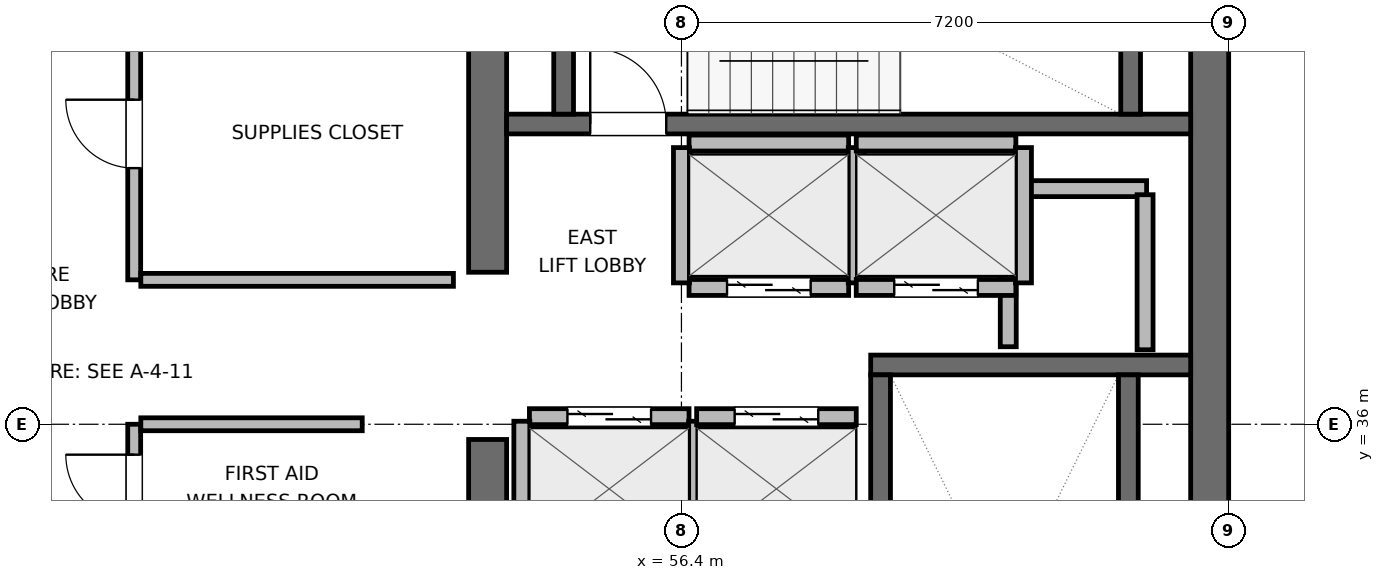
"""IFC4 building model, lengths in metres.
Left out: names, types, materials, properties, quantities, classifications, styles, units other than length and angle.
Written with IfcOpenShell. Run it as: python <this file> out.ifc"""

import sys

from ifc_helpers import new_model, si_unit, direction, frame, frame_2d, origin, place, context, subcontext, project, spatial, rectangle, extrude, element, fill, save


model = new_model("IFC4")
c1 = context("Model", 3, precision=1e-05, world=origin(), true_north=direction((0.0, 1.0)))
c2 = subcontext(c1, "Body", "Model", "MODEL_VIEW")
j1 = project(units=[si_unit("LENGTHUNIT", "METRE"), si_unit("PLANEANGLEUNIT", "RADIAN")], contexts=[c1])
p1 = place(None, origin())
s1 = spatial("IfcSite", under=j1, at=p1, CompositionType="ELEMENT")
p2 = place(p1, origin())
s2 = spatial("IfcBuilding", under=s1, at=p2, CompositionType="ELEMENT")
p3 = place(p2, frame((0.0, 0.0, 286.2)))
s3 = spatial("IfcBuildingStorey", under=s2, at=p3, CompositionType="ELEMENT", Elevation=286.2)
p4 = place(p3, frame((53.85, 27.85, 0.0), z_axis=(0.0, 0.0, 1.0), x_axis=(0.0, 1.0, 0.0)))
e1 = element("IfcWall", 1, at=p4, inside=s3, PredefinedType="SHEAR", context=c2, shape_type="SweptSolid", body=[
    extrude(rectangle(XDim=7.95, YDim=0.5, at=frame_2d((3.975, 0.0))), origin(), (0.0, 0.0, 1.0), 3.9),
])
p5 = place(p3, frame((53.85, 38.0, 0.0), z_axis=(0.0, 0.0, 1.0), x_axis=(0.0, 1.0, 0.0)))
e2 = element("IfcWall", 2, at=p5, inside=s3, PredefinedType="SHEAR", context=c2, shape_type="SweptSolid", body=[
    extrude(rectangle(XDim=6.15, YDim=0.5, at=frame_2d((3.075, 0.0))), origin(), (0.0, 0.0, 1.0), 3.9),
])
p6 = place(p3, frame((63.35, 27.6, 0.0), z_axis=(0.0, 0.0, 1.0), x_axis=(0.0, 1.0, 0.0)))
e3 = element("IfcWall", 3, at=p6, inside=s3, PredefinedType="SHEAR", context=c2, shape_type="SweptSolid", body=[
    extrude(rectangle(XDim=16.8, YDim=0.5, at=frame_2d((8.4, 0.0))), origin(), (0.0, 0.0, 1.0), 3.9),
])
p7 = place(p3, frame((58.89, 36.78, 0.0), z_axis=(0.0, 0.0, 1.0), x_axis=(1.0, 0.0, 0.0)))
e4 = element("IfcWall", 4, at=p7, inside=s3, PredefinedType="SHEAR", context=c2, shape_type="SweptSolid", body=[
    extrude(rectangle(XDim=4.21, YDim=0.26, at=frame_2d((2.105, 0.0))), origin(), (0.0, 0.0, 1.0), 3.9),
])
p8 = place(p3, frame((59.02, 29.05, 0.0), z_axis=(0.0, 0.0, 1.0), x_axis=(0.0, 1.0, 0.0)))
e5 = element("IfcWall", 5, at=p8, inside=s3, PredefinedType="SHEAR", context=c2, shape_type="SweptSolid", body=[
    extrude(rectangle(XDim=7.6, YDim=0.26, at=frame_2d((3.8, 0.0))), origin(), (0.0, 0.0, 1.0), 3.9),
])
p9 = place(p8, frame((0.3, 0.0, 0.0)))
e6 = element("IfcOpeningElement", 6, at=p9, cuts=e5, PredefinedType="OPENING", context=c2, shape_type="SweptSolid", body=[
    extrude(rectangle(XDim=1.0, YDim=2.04, at=frame_2d((0.5, 1.02))), frame((0.0, 0.14, 0.0), z_axis=(0.0, -1.0, 0.0), x_axis=(1.0, 0.0, 0.0)), (0.0, 0.0, 1.0), 0.28),
])
p10 = place(p3, frame((62.28, 29.05, 0.0), z_axis=(0.0, 0.0, 1.0), x_axis=(0.0, 1.0, 0.0)))
e7 = element("IfcWall", 7, at=p10, inside=s3, PredefinedType="SHEAR", context=c2, shape_type="SweptSolid", body=[
    extrude(rectangle(XDim=7.6, YDim=0.26, at=frame_2d((3.8, 0.0))), origin(), (0.0, 0.0, 1.0), 3.9),
])
p11 = place(p3, frame((54.1, 39.95, 0.0), z_axis=(0.0, 0.0, 1.0), x_axis=(1.0, 0.0, 0.0)))
e8 = element("IfcWall", 8, at=p11, inside=s3, PredefinedType="SHEAR", context=c2, shape_type="SweptSolid", body=[
    extrude(rectangle(XDim=9.0, YDim=0.26, at=frame_2d((4.5, 0.0))), origin(), (0.0, 0.0, 1.0), 3.9),
])
p12 = place(p11, frame((1.1, 0.0, 0.0)))
e9 = element("IfcOpeningElement", 9, at=p12, cuts=e8, PredefinedType="OPENING", context=c2, shape_type="SweptSolid", body=[
    extrude(rectangle(XDim=1.0, YDim=2.04, at=frame_2d((0.5, 1.02))), frame((0.0, 0.14, 0.0), z_axis=(0.0, -1.0, 0.0), x_axis=(1.0, 0.0, 0.0)), (0.0, 0.0, 1.0), 0.28),
])
for number, where, z_axis, x_axis in (
    (10, (54.85, 40.08, 0.0), (0.0, 0.0, 1.0), (0.0, 1.0, 0.0)),
    (11, (62.31, 40.08, 0.0), (0.0, 0.0, 1.0), (0.0, 1.0, 0.0)),
):
    element("IfcWall", number, at=place(p3, frame(where, z_axis=z_axis, x_axis=x_axis)), inside=s3, PredefinedType="SHEAR", context=c2, shape_type="SweptSolid", body=[
        extrude(rectangle(XDim=2.94, YDim=0.26, at=frame_2d((1.47, 0.0))), origin(), (0.0, 0.0, 1.0), 3.9),
    ])
p13 = place(p3, frame((60.72, 39.1, 0.0), z_axis=(0.0, 0.0, 1.0), x_axis=(1.0, 0.0, 0.0)))
e12 = element("IfcWall", 12, at=p13, inside=s3, PredefinedType="PARTITIONING", context=c2, shape_type="SweptSolid", body=[
    extrude(rectangle(XDim=1.8, YDim=0.21, at=frame_2d((0.9, 0.0))), origin(), (0.0, 0.0, 1.0), 3.68),
])
p14 = place(p3, frame((60.7, 37.02, 0.0), z_axis=(0.0, 0.0, 1.0), x_axis=(0.0, 1.0, 0.0)))
e13 = element("IfcWall", 13, at=p14, inside=s3, PredefinedType="PARTITIONING", context=c2, shape_type="SweptSolid", body=[
    extrude(rectangle(XDim=1.96, YDim=0.21, at=frame_2d((0.98, 0.0))), origin(), (0.0, 0.0, 1.0), 3.68),
])
p15 = place(p3, frame((62.5, 36.98, 0.0), z_axis=(0.0, 0.0, 1.0), x_axis=(0.0, 1.0, 0.0)))
e14 = element("IfcWall", 14, at=p15, inside=s3, PredefinedType="PARTITIONING", context=c2, shape_type="SweptSolid", body=[
    extrude(rectangle(XDim=2.04, YDim=0.21, at=frame_2d((1.02, 0.0))), origin(), (0.0, 0.0, 1.0), 3.68),
])
p16 = place(p3, frame((54.4, 36.1, 0.0), z_axis=(0.0, 0.0, 1.0), x_axis=(1.0, 0.0, 0.0)))
e15 = element("IfcWall", 15, at=p16, inside=s3, PredefinedType="PARTITIONING", context=c2, shape_type="SweptSolid", body=[
    extrude(rectangle(XDim=2.1, YDim=0.21, at=frame_2d((1.05, 0.0))), origin(), (0.0, 0.0, 1.0), 3.68),
])
p17 = place(p16, frame((0.5, 0.0, 0.0)))
e16 = element("IfcOpeningElement", 16, at=p17, cuts=e15, PredefinedType="OPENING", context=c2, shape_type="SweptSolid", body=[
    extrude(rectangle(XDim=1.1, YDim=2.04, at=frame_2d((0.55, 1.02))), frame((0.0, 0.115, 0.0), z_axis=(0.0, -1.0, 0.0), x_axis=(1.0, 0.0, 0.0)), (0.0, 0.0, 1.0), 0.23),
])
for number, where, z_axis, x_axis in (
    (17, (54.3, 34.26, 0.0), (0.0, 0.0, 1.0), (0.0, 1.0, 0.0)),
    (18, (56.6, 34.26, 0.0), (0.0, 0.0, 1.0), (0.0, 1.0, 0.0)),
):
    element("IfcWall", number, at=place(p3, frame(where, z_axis=z_axis, x_axis=x_axis)), inside=s3, PredefinedType="PARTITIONING", context=c2, shape_type="SweptSolid", body=[
        extrude(rectangle(XDim=1.78, YDim=0.21, at=frame_2d((0.89, 0.0))), origin(), (0.0, 0.0, 1.0), 3.68),
    ])
p18 = place(p3, frame((56.6, 36.1, 0.0), z_axis=(0.0, 0.0, 1.0), x_axis=(1.0, 0.0, 0.0)))
e19 = element("IfcWall", 19, at=p18, inside=s3, PredefinedType="PARTITIONING", context=c2, shape_type="SweptSolid", body=[
    extrude(rectangle(XDim=2.1, YDim=0.21, at=frame_2d((1.05, 0.0))), origin(), (0.0, 0.0, 1.0), 3.68),
])
p19 = place(p18, frame((0.5, 0.0, 0.0)))
e20 = element("IfcOpeningElement", 20, at=p19, cuts=e19, PredefinedType="OPENING", context=c2, shape_type="SweptSolid", body=[
    extrude(rectangle(XDim=1.1, YDim=2.04, at=frame_2d((0.55, 1.02))), frame((0.0, 0.115, 0.0), z_axis=(0.0, -1.0, 0.0), x_axis=(1.0, 0.0, 0.0)), (0.0, 0.0, 1.0), 0.23),
])
p20 = place(p3, frame((56.5, 37.8, 0.0), z_axis=(0.0, 0.0, 1.0), x_axis=(1.0, 0.0, 0.0)))
e21 = element("IfcWall", 21, at=p20, inside=s3, PredefinedType="PARTITIONING", context=c2, shape_type="SweptSolid", body=[
    extrude(rectangle(XDim=2.1, YDim=0.21, at=frame_2d((1.05, 0.0))), origin(), (0.0, 0.0, 1.0), 3.68),
])
p21 = place(p20, frame((0.5, 0.0, 0.0)))
e22 = element("IfcOpeningElement", 22, at=p21, cuts=e21, PredefinedType="OPENING", context=c2, shape_type="SweptSolid", body=[
    extrude(rectangle(XDim=1.1, YDim=2.04, at=frame_2d((0.55, 1.02))), frame((0.0, 0.115, 0.0), z_axis=(0.0, -1.0, 0.0), x_axis=(1.0, 0.0, 0.0)), (0.0, 0.0, 1.0), 0.23),
])
p22 = place(p3, frame((56.5, 39.7, 0.0), z_axis=(0.0, 0.0, 1.0), x_axis=(1.0, 0.0, 0.0)))
e23 = element("IfcWall", 23, at=p22, inside=s3, PredefinedType="PARTITIONING", context=c2, shape_type="SweptSolid", body=[
    extrude(rectangle(XDim=2.1, YDim=0.21, at=frame_2d((1.05, 0.0))), origin(), (0.0, 0.0, 1.0), 3.68),
])
for number, where, z_axis, x_axis in (
    (24, (56.4, 37.86, 0.0), (0.0, 0.0, 1.0), (0.0, 1.0, 0.0)),
    (25, (58.7, 37.86, 0.0), (0.0, 0.0, 1.0), (0.0, 1.0, 0.0)),
):
    element("IfcWall", number, at=place(p3, frame(where, z_axis=z_axis, x_axis=x_axis)), inside=s3, PredefinedType="PARTITIONING", context=c2, shape_type="SweptSolid", body=[
        extrude(rectangle(XDim=1.78, YDim=0.21, at=frame_2d((0.89, 0.0))), origin(), (0.0, 0.0, 1.0), 3.68),
    ])
p23 = place(p3, frame((58.7, 37.8, 0.0), z_axis=(0.0, 0.0, 1.0), x_axis=(1.0, 0.0, 0.0)))
e26 = element("IfcWall", 26, at=p23, inside=s3, PredefinedType="PARTITIONING", context=c2, shape_type="SweptSolid", body=[
    extrude(rectangle(XDim=2.1, YDim=0.21, at=frame_2d((1.05, 0.0))), origin(), (0.0, 0.0, 1.0), 3.68),
])
p24 = place(p23, frame((0.5, 0.0, 0.0)))
e27 = element("IfcOpeningElement", 27, at=p24, cuts=e26, PredefinedType="OPENING", context=c2, shape_type="SweptSolid", body=[
    extrude(rectangle(XDim=1.1, YDim=2.04, at=frame_2d((0.55, 1.02))), frame((0.0, 0.115, 0.0), z_axis=(0.0, -1.0, 0.0), x_axis=(1.0, 0.0, 0.0)), (0.0, 0.0, 1.0), 0.23),
])
p25 = place(p3, frame((58.7, 39.7, 0.0), z_axis=(0.0, 0.0, 1.0), x_axis=(1.0, 0.0, 0.0)))
e28 = element("IfcWall", 28, at=p25, inside=s3, PredefinedType="PARTITIONING", context=c2, shape_type="SweptSolid", body=[
    extrude(rectangle(XDim=2.1, YDim=0.21, at=frame_2d((1.05, 0.0))), origin(), (0.0, 0.0, 1.0), 3.68),
])
p26 = place(p3, frame((60.9, 37.86, 0.0), z_axis=(0.0, 0.0, 1.0), x_axis=(0.0, 1.0, 0.0)))
e29 = element("IfcWall", 29, at=p26, inside=s3, PredefinedType="PARTITIONING", context=c2, shape_type="SweptSolid", body=[
    extrude(rectangle(XDim=1.78, YDim=0.21, at=frame_2d((0.89, 0.0))), origin(), (0.0, 0.0, 1.0), 3.68),
])
p27 = place(p3, frame((49.2, 32.6, 0.0), z_axis=(0.0, 0.0, 1.0), x_axis=(0.0, 1.0, 0.0)))
e30 = element("IfcWall", 30, at=p27, inside=s3, PredefinedType="PARTITIONING", context=c2, shape_type="SweptSolid", body=[
    extrude(rectangle(XDim=3.4, YDim=0.17, at=frame_2d((1.7, 0.0))), origin(), (0.0, 0.0, 1.0), 3.68),
])
p28 = place(p27, frame((0.4, 0.0, 0.0)))
e31 = element("IfcOpeningElement", 31, at=p28, cuts=e30, PredefinedType="OPENING", context=c2, shape_type="SweptSolid", body=[
    extrude(rectangle(XDim=0.9, YDim=2.02, at=frame_2d((0.45, 1.01))), frame((0.0, 0.095, 0.0), z_axis=(0.0, -1.0, 0.0), x_axis=(1.0, 0.0, 0.0)), (0.0, 0.0, 1.0), 0.19),
])
p29 = place(p27, frame((2.1, 0.0, 0.0)))
e32 = element("IfcOpeningElement", 32, at=p29, cuts=e30, PredefinedType="OPENING", context=c2, shape_type="SweptSolid", body=[
    extrude(rectangle(XDim=0.9, YDim=2.02, at=frame_2d((0.45, 1.01))), frame((0.0, 0.095, 0.0), z_axis=(0.0, -1.0, 0.0), x_axis=(1.0, 0.0, 0.0)), (0.0, 0.0, 1.0), 0.19),
])
p30 = place(p3, frame((49.287, 36.0, 0.0), z_axis=(0.0, 0.0, 1.0), x_axis=(1.0, 0.0, 0.0)))
e33 = element("IfcWall", 33, at=p30, inside=s3, PredefinedType="PARTITIONING", context=c2, shape_type="SweptSolid", body=[
    extrude(rectangle(XDim=2.913, YDim=0.17, at=frame_2d((1.457, 0.0))), origin(), (0.0, 0.0, 1.0), 3.68),
])
p31 = place(p3, frame((49.2, 37.9, 0.0), z_axis=(0.0, 0.0, 1.0), x_axis=(0.0, 1.0, 0.0)))
e34 = element("IfcWall", 34, at=p31, inside=s3, PredefinedType="PARTITIONING", context=c2, shape_type="SweptSolid", body=[
    extrude(rectangle(XDim=6.0, YDim=0.17, at=frame_2d((3.0, 0.0))), origin(), (0.0, 0.0, 1.0), 3.68),
])
p32 = place(p31, frame((1.47, 0.0, 0.0)))
e35 = element("IfcOpeningElement", 35, at=p32, cuts=e34, PredefinedType="OPENING", context=c2, shape_type="SweptSolid", body=[
    extrude(rectangle(XDim=0.9, YDim=2.02, at=frame_2d((0.45, 1.01))), frame((0.0, 0.095, 0.0), z_axis=(0.0, -1.0, 0.0), x_axis=(1.0, 0.0, 0.0)), (0.0, 0.0, 1.0), 0.19),
])
p33 = place(p31, frame((4.47, 0.0, 0.0)))
e36 = element("IfcOpeningElement", 36, at=p33, cuts=e34, PredefinedType="OPENING", context=c2, shape_type="SweptSolid", body=[
    extrude(rectangle(XDim=0.9, YDim=2.02, at=frame_2d((0.45, 1.01))), frame((0.0, 0.095, 0.0), z_axis=(0.0, -1.0, 0.0), x_axis=(1.0, 0.0, 0.0)), (0.0, 0.0, 1.0), 0.19),
])
p34 = place(p3, frame((49.287, 37.9, 0.0), z_axis=(0.0, 0.0, 1.0), x_axis=(1.0, 0.0, 0.0)))
e37 = element("IfcWall", 37, at=p34, inside=s3, PredefinedType="PARTITIONING", context=c2, shape_type="SweptSolid", body=[
    extrude(rectangle(XDim=4.113, YDim=0.17, at=frame_2d((2.056, 0.0))), origin(), (0.0, 0.0, 1.0), 3.68),
])
p35 = place(p12, origin())
e38 = element("IfcDoor", 38, at=p35, inside=s3, OperationType="SINGLE_SWING_LEFT", PredefinedType="DOOR", context=c2, shape_type="SweptSolid", body=[
    extrude(rectangle(XDim=1.0, YDim=2.04, at=frame_2d((0.5, 1.02))), frame((0.0, 0.025, 0.0), z_axis=(0.0, -1.0, 0.0), x_axis=(1.0, 0.0, 0.0)), (0.0, 0.0, 1.0), 0.05),
])
fill(e9, e38)
p36 = place(p17, origin())
e39 = element("IfcDoor", 39, at=p36, inside=s3, OperationType="DOUBLE_DOOR_SLIDING", PredefinedType="DOOR", context=c2, shape_type="SweptSolid", body=[
    extrude(rectangle(XDim=1.1, YDim=2.04, at=frame_2d((0.55, 1.02))), frame((0.0, 0.025, 0.0), z_axis=(0.0, -1.0, 0.0), x_axis=(1.0, 0.0, 0.0)), (0.0, 0.0, 1.0), 0.05),
])
fill(e16, e39)
p37 = place(p19, origin())
e40 = element("IfcDoor", 40, at=p37, inside=s3, OperationType="DOUBLE_DOOR_SLIDING", PredefinedType="DOOR", context=c2, shape_type="SweptSolid", body=[
    extrude(rectangle(XDim=1.1, YDim=2.04, at=frame_2d((0.55, 1.02))), frame((0.0, 0.025, 0.0), z_axis=(0.0, -1.0, 0.0), x_axis=(1.0, 0.0, 0.0)), (0.0, 0.0, 1.0), 0.05),
])
fill(e20, e40)
p38 = place(p21, origin())
e41 = element("IfcDoor", 41, at=p38, inside=s3, OperationType="DOUBLE_DOOR_SLIDING", PredefinedType="DOOR", context=c2, shape_type="SweptSolid", body=[
    extrude(rectangle(XDim=1.1, YDim=2.04, at=frame_2d((0.55, 1.02))), frame((0.0, 0.025, 0.0), z_axis=(0.0, -1.0, 0.0), x_axis=(1.0, 0.0, 0.0)), (0.0, 0.0, 1.0), 0.05),
])
fill(e22, e41)
p39 = place(p24, origin())
e42 = element("IfcDoor", 42, at=p39, inside=s3, OperationType="DOUBLE_DOOR_SLIDING", PredefinedType="DOOR", context=c2, shape_type="SweptSolid", body=[
    extrude(rectangle(XDim=1.1, YDim=2.04, at=frame_2d((0.55, 1.02))), frame((0.0, 0.025, 0.0), z_axis=(0.0, -1.0, 0.0), x_axis=(1.0, 0.0, 0.0)), (0.0, 0.0, 1.0), 0.05),
])
fill(e27, e42)
p40 = place(p29, origin())
e43 = element("IfcDoor", 43, at=p40, inside=s3, OperationType="SINGLE_SWING_RIGHT", PredefinedType="DOOR", context=c2, shape_type="SweptSolid", body=[
    extrude(rectangle(XDim=0.9, YDim=2.02, at=frame_2d((0.45, 1.01))), frame((0.0, 0.025, 0.0), z_axis=(0.0, -1.0, 0.0), x_axis=(1.0, 0.0, 0.0)), (0.0, 0.0, 1.0), 0.05),
])
fill(e32, e43)
p41 = place(p32, origin())
e44 = element("IfcDoor", 44, at=p41, inside=s3, OperationType="SINGLE_SWING_RIGHT", PredefinedType="DOOR", context=c2, shape_type="SweptSolid", body=[
    extrude(rectangle(XDim=0.9, YDim=2.02, at=frame_2d((0.45, 1.01))), frame((0.0, 0.025, 0.0), z_axis=(0.0, -1.0, 0.0), x_axis=(1.0, 0.0, 0.0)), (0.0, 0.0, 1.0), 0.05),
])
fill(e35, e44)
save(model, sys.argv[1])
